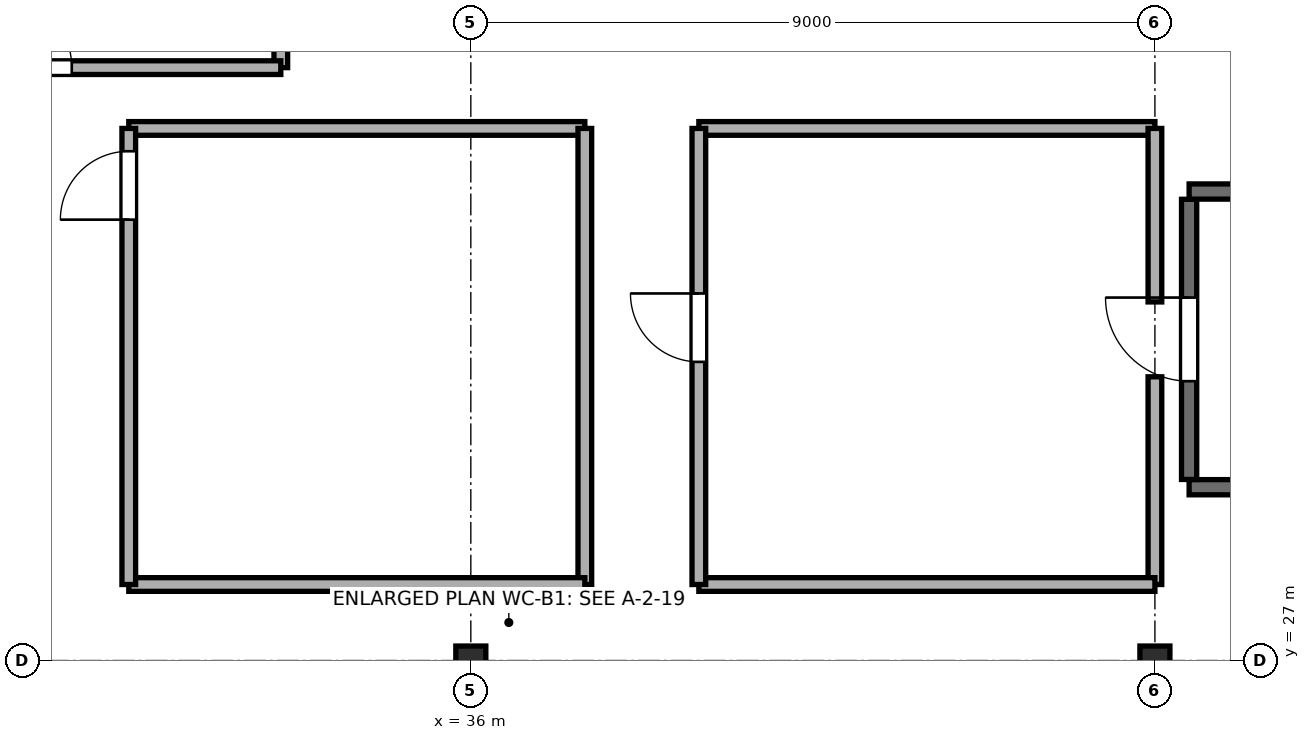
"""IFC4 building model, lengths in metres.
Left out: names, types, materials, properties, quantities, classifications, styles, units other than length and angle.
Written with IfcOpenShell. Run it as: python <this file> out.ifc"""

import sys

from ifc_helpers import new_model, si_unit, direction, frame, frame_2d, origin, origin_2d, place, context, subcontext, project, spatial, rectangle, i_section, extrude, element, fill, save


model = new_model("IFC4")
c1 = context("Model", 3, precision=1e-05, world=origin(), true_north=direction((0.0, 1.0)))
c2 = subcontext(c1, "Body", "Model", "MODEL_VIEW")
j1 = project(units=[si_unit("LENGTHUNIT", "METRE"), si_unit("PLANEANGLEUNIT", "RADIAN")], contexts=[c1])
p1 = place(None, origin())
s1 = spatial("IfcSite", under=j1, at=p1, CompositionType="ELEMENT")
p2 = place(p1, origin())
s2 = spatial("IfcBuilding", under=s1, at=p2, CompositionType="ELEMENT")
p3 = place(p2, frame((0.0, 0.0, -5.4)))
s3 = spatial("IfcBuildingStorey", under=s2, at=p3, CompositionType="ELEMENT", Elevation=-5.4)
for number, where, z_axis, x_axis in (
    (1, (36.0, 27.0, 0.0), (0.0, 0.0, 1.0), (1.0, 0.0, 0.0)),
    (2, (45.0, 27.0, 0.0), (0.0, 0.0, 1.0), (1.0, 0.0, 0.0)),
):
    element("IfcColumn", number, at=place(p3, frame(where, z_axis=z_axis, x_axis=x_axis)), inside=s3, PredefinedType="COLUMN", context=c2, shape_type="SweptSolid", body=[
        extrude(i_section(OverallWidth=0.395, OverallDepth=0.381, WebThickness=0.018, FlangeThickness=0.03, FilletRadius=0.015, at=origin_2d()), origin(), (0.0, 0.0, 1.0), 5.4),
    ])
p4 = place(p3, frame((45.45, 29.28, 0.0), z_axis=(0.0, 0.0, 1.0), x_axis=(1.0, 0.0, 0.0)))
e3 = element("IfcWall", 3, at=p4, inside=s3, PredefinedType="SHEAR", context=c2, shape_type="SweptSolid", body=[
    extrude(rectangle(XDim=7.95, YDim=0.2, at=frame_2d((3.975, 0.0))), origin(), (0.0, 0.0, 1.0), 5.4),
])
p5 = place(p3, frame((45.45, 29.382, 0.0), z_axis=(0.0, 0.0, 1.0), x_axis=(0.0, 1.0, 0.0)))
e4 = element("IfcWall", 4, at=p5, inside=s3, PredefinedType="SHEAR", context=c2, shape_type="SweptSolid", body=[
    extrude(rectangle(XDim=3.686, YDim=0.2, at=frame_2d((1.843, 0.0))), origin(), (0.0, 0.0, 1.0), 5.4),
])
p6 = place(p5, frame((1.293, 0.0, 0.0)))
e5 = element("IfcOpeningElement", 5, at=p6, cuts=e4, PredefinedType="OPENING", context=c2, shape_type="SweptSolid", body=[
    extrude(rectangle(XDim=1.1, YDim=2.15, at=frame_2d((0.55, 1.075))), frame((0.0, 0.11, 0.0), z_axis=(0.0, -1.0, 0.0), x_axis=(1.0, 0.0, 0.0)), (0.0, 0.0, 1.0), 0.22),
])
p7 = place(p3, frame((45.45, 33.17, 0.0), z_axis=(0.0, 0.0, 1.0), x_axis=(1.0, 0.0, 0.0)))
e6 = element("IfcWall", 6, at=p7, inside=s3, PredefinedType="SHEAR", context=c2, shape_type="SweptSolid", body=[
    extrude(rectangle(XDim=7.95, YDim=0.2, at=frame_2d((3.975, 0.0))), origin(), (0.0, 0.0, 1.0), 5.4),
])
for number, where, z_axis, x_axis in (
    (7, (31.5, 34.0, 0.0), (0.0, 0.0, 1.0), (1.0, 0.0, 0.0)),
    (8, (37.5, 34.0, 0.0), (0.0, 0.0, 1.0), (0.0, -1.0, 0.0)),
    (9, (37.5, 28.0, 0.0), (0.0, 0.0, 1.0), (-1.0, 0.0, 0.0)),
):
    element("IfcWall", number, at=place(p3, frame(where, z_axis=z_axis, x_axis=x_axis)), inside=s3, PredefinedType="PARTITIONING", context=c2, shape_type="SweptSolid", body=[
        extrude(rectangle(XDim=6.0, YDim=0.18, at=frame_2d((3.0, 0.0))), origin(), (0.0, 0.0, 1.0), 5.04),
    ])
p8 = place(p3, frame((31.5, 28.0, 0.0), z_axis=(0.0, 0.0, 1.0), x_axis=(0.0, 1.0, 0.0)))
e10 = element("IfcWall", 10, at=p8, inside=s3, PredefinedType="PARTITIONING", context=c2, shape_type="SweptSolid", body=[
    extrude(rectangle(XDim=6.0, YDim=0.18, at=frame_2d((3.0, 0.0))), origin(), (0.0, 0.0, 1.0), 5.04),
])
p9 = place(p8, frame((4.8, 0.0, 0.0)))
e11 = element("IfcOpeningElement", 11, at=p9, cuts=e10, PredefinedType="OPENING", context=c2, shape_type="SweptSolid", body=[
    extrude(rectangle(XDim=0.9, YDim=2.1, at=frame_2d((0.45, 1.05))), frame((0.0, 0.1, 0.0), z_axis=(0.0, -1.0, 0.0), x_axis=(1.0, 0.0, 0.0)), (0.0, 0.0, 1.0), 0.2),
])
p10 = place(p3, frame((39.0, 34.0, 0.0), z_axis=(0.0, 0.0, 1.0), x_axis=(1.0, 0.0, 0.0)))
e12 = element("IfcWall", 12, at=p10, inside=s3, PredefinedType="PARTITIONING", context=c2, shape_type="SweptSolid", body=[
    extrude(rectangle(XDim=6.0, YDim=0.18, at=frame_2d((3.0, 0.0))), origin(), (0.0, 0.0, 1.0), 5.04),
])
p11 = place(p3, frame((45.0, 34.0, 0.0), z_axis=(0.0, 0.0, 1.0), x_axis=(0.0, -1.0, 0.0)))
e13 = element("IfcWall", 13, at=p11, inside=s3, PredefinedType="PARTITIONING", context=c2, shape_type="SweptSolid", body=[
    extrude(rectangle(XDim=2.283, YDim=0.18, at=frame_2d((1.141, 0.0))), origin(), (0.0, 0.0, 1.0), 4.427),
])
p12 = place(p3, frame((45.0, 30.733, 0.0), z_axis=(0.0, 0.0, 1.0), x_axis=(0.0, -1.0, 0.0)))
e14 = element("IfcWall", 14, at=p12, inside=s3, PredefinedType="PARTITIONING", context=c2, shape_type="SweptSolid", body=[
    extrude(rectangle(XDim=2.733, YDim=0.18, at=frame_2d((1.366, 0.0))), origin(), (0.0, 0.0, 1.0), 4.427),
])
p13 = place(p3, frame((45.0, 28.0, 0.0), z_axis=(0.0, 0.0, 1.0), x_axis=(-1.0, 0.0, 0.0)))
e15 = element("IfcWall", 15, at=p13, inside=s3, PredefinedType="PARTITIONING", context=c2, shape_type="SweptSolid", body=[
    extrude(rectangle(XDim=6.0, YDim=0.18, at=frame_2d((3.0, 0.0))), origin(), (0.0, 0.0, 1.0), 5.04),
])
p14 = place(p3, frame((39.0, 28.0, 0.0), z_axis=(0.0, 0.0, 1.0), x_axis=(0.0, 1.0, 0.0)))
e16 = element("IfcWall", 16, at=p14, inside=s3, PredefinedType="PARTITIONING", context=c2, shape_type="SweptSolid", body=[
    extrude(rectangle(XDim=6.0, YDim=0.18, at=frame_2d((3.0, 0.0))), origin(), (0.0, 0.0, 1.0), 5.04),
])
p15 = place(p14, frame((2.929, 0.0, 0.0)))
e17 = element("IfcOpeningElement", 17, at=p15, cuts=e16, PredefinedType="OPENING", context=c2, shape_type="SweptSolid", body=[
    extrude(rectangle(XDim=0.9, YDim=2.1, at=frame_2d((0.45, 1.05))), frame((0.0, 0.1, 0.0), z_axis=(0.0, -1.0, 0.0), x_axis=(1.0, 0.0, 0.0)), (0.0, 0.0, 1.0), 0.2),
])
p16 = place(p3, frame((33.5, 34.8, 0.0), z_axis=(0.0, 0.0, 1.0), x_axis=(0.0, 1.0, 0.0)))
e18 = element("IfcWall", 18, at=p16, inside=s3, PredefinedType="PARTITIONING", context=c2, shape_type="SweptSolid", body=[
    extrude(rectangle(XDim=3.0, YDim=0.18, at=frame_2d((1.5, 0.0))), origin(), (0.0, 0.0, 1.0), 5.04),
])
p17 = place(p3, frame((28.5, 34.8, 0.0), z_axis=(0.0, 0.0, 1.0), x_axis=(1.0, 0.0, 0.0)))
e19 = element("IfcWall", 19, at=p17, inside=s3, PredefinedType="PARTITIONING", context=c2, shape_type="SweptSolid", body=[
    extrude(rectangle(XDim=5.0, YDim=0.18, at=frame_2d((2.5, 0.0))), origin(), (0.0, 0.0, 1.0), 5.04),
])
p18 = place(p17, frame((1.25, 0.0, 0.0)))
e20 = element("IfcOpeningElement", 20, at=p18, cuts=e19, PredefinedType="OPENING", context=c2, shape_type="SweptSolid", body=[
    extrude(rectangle(XDim=1.0, YDim=2.15, at=frame_2d((0.5, 1.075))), frame((0.0, 0.1, 0.0), z_axis=(0.0, -1.0, 0.0), x_axis=(1.0, 0.0, 0.0)), (0.0, 0.0, 1.0), 0.2),
])
p19 = place(p6, frame((1.1, 0.0, 0.0), z_axis=(0.0, 0.0, 1.0), x_axis=(-1.0, 0.0, 0.0)))
e21 = element("IfcDoor", 21, at=p19, inside=s3, OperationType="SINGLE_SWING_LEFT", PredefinedType="DOOR", context=c2, shape_type="SweptSolid", body=[
    extrude(rectangle(XDim=1.1, YDim=2.15, at=frame_2d((0.55, 1.075))), frame((0.0, 0.025, 0.0), z_axis=(0.0, -1.0, 0.0), x_axis=(1.0, 0.0, 0.0)), (0.0, 0.0, 1.0), 0.05),
])
fill(e5, e21)
p20 = place(p9, origin())
e22 = element("IfcDoor", 22, at=p20, inside=s3, OperationType="SINGLE_SWING_LEFT", PredefinedType="DOOR", context=c2, shape_type="SweptSolid", body=[
    extrude(rectangle(XDim=0.9, YDim=2.1, at=frame_2d((0.45, 1.05))), frame((0.0, 0.025, 0.0), z_axis=(0.0, -1.0, 0.0), x_axis=(1.0, 0.0, 0.0)), (0.0, 0.0, 1.0), 0.05),
])
fill(e11, e22)
p21 = place(p15, origin())
e23 = element("IfcDoor", 23, at=p21, inside=s3, OperationType="SINGLE_SWING_RIGHT", PredefinedType="DOOR", context=c2, shape_type="SweptSolid", body=[
    extrude(rectangle(XDim=0.9, YDim=2.1, at=frame_2d((0.45, 1.05))), frame((0.0, 0.025, 0.0), z_axis=(0.0, -1.0, 0.0), x_axis=(1.0, 0.0, 0.0)), (0.0, 0.0, 1.0), 0.05),
])
fill(e17, e23)
p22 = place(p18, origin())
e24 = element("IfcDoor", 24, at=p22, inside=s3, OperationType="SINGLE_SWING_LEFT", PredefinedType="DOOR", context=c2, shape_type="SweptSolid", body=[
    extrude(rectangle(XDim=1.0, YDim=2.15, at=frame_2d((0.5, 1.075))), frame((0.0, 0.025, 0.0), z_axis=(0.0, -1.0, 0.0), x_axis=(1.0, 0.0, 0.0)), (0.0, 0.0, 1.0), 0.05),
])
fill(e20, e24)
save(model, sys.argv[1])
